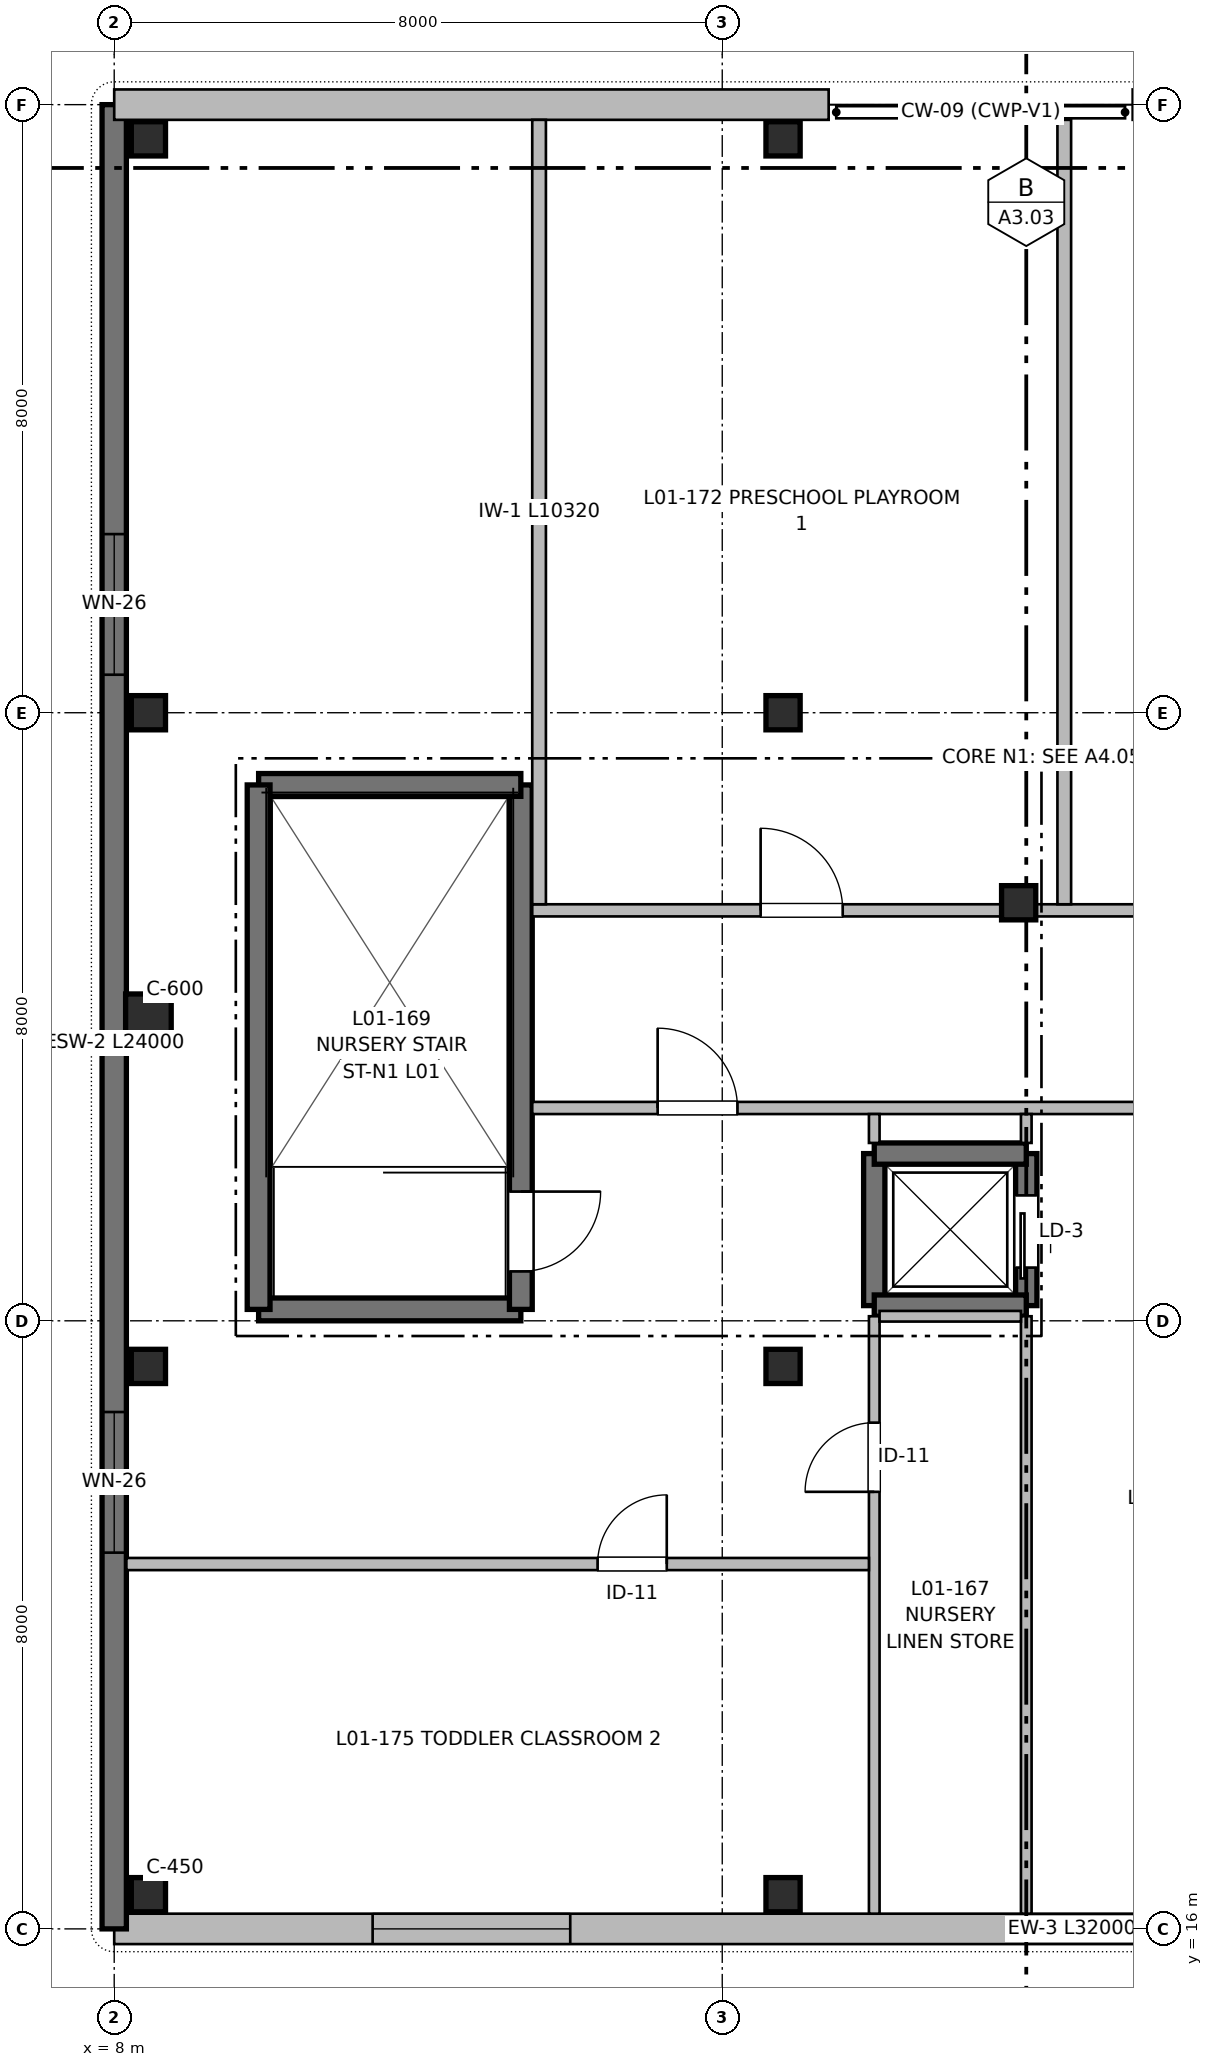
"""IFC4 building model, lengths in metres.
Left out: names, types, materials, properties, quantities, classifications, styles, units other than length and angle.
Written with IfcOpenShell. Run it as: python <this file> out.ifc"""

import sys

from ifc_helpers import new_model, si_unit, direction, frame, frame_2d, origin, origin_2d, place, context, subcontext, project, spatial, rectangle, extrude, element, fill, save


model = new_model("IFC4")
c1 = context("Model", 3, precision=1e-05, world=origin(), true_north=direction((0.0, 1.0)))
c2 = subcontext(c1, "Body", "Model", "MODEL_VIEW")
j1 = project(units=[si_unit("LENGTHUNIT", "METRE"), si_unit("PLANEANGLEUNIT", "RADIAN")], contexts=[c1])
p1 = place(None, origin())
s1 = spatial("IfcSite", under=j1, at=p1, CompositionType="ELEMENT")
p2 = place(p1, origin())
s2 = spatial("IfcBuilding", under=s1, at=p2, CompositionType="ELEMENT")
p3 = place(p2, frame((0.0, 0.0, 4.16)))
s3 = spatial("IfcBuildingStorey", under=s2, at=p3, CompositionType="ELEMENT", Elevation=4.16)
for number, where, z_axis, x_axis in (
    (1, (8.45, 16.45, 0.0), (0.0, 0.0, 1.0), (1.0, 0.0, 0.0)),
    (2, (8.45, 23.4, 0.0), (0.0, 0.0, 1.0), (1.0, 0.0, 0.0)),
):
    element("IfcColumn", number, at=place(p3, frame(where, z_axis=z_axis, x_axis=x_axis)), inside=s3, PredefinedType="COLUMN", context=c2, shape_type="SweptSolid", body=[
        extrude(rectangle(XDim=0.45, YDim=0.45, at=origin_2d()), origin(), (0.0, 0.0, 1.0), 3.2),
    ])
p4 = place(p3, frame((8.45, 28.0, 0.0), z_axis=(0.0, 0.0, 1.0), x_axis=(1.0, 0.0, 0.0)))
e3 = element("IfcColumn", 3, at=p4, inside=s3, PredefinedType="COLUMN", context=c2, shape_type="SweptSolid", body=[
    extrude(rectangle(XDim=0.6, YDim=0.6, at=origin_2d()), origin(), (0.0, 0.0, 1.0), 5.19),
])
for number, where, z_axis, x_axis in (
    (4, (8.45, 32.0, 0.0), (0.0, 0.0, 1.0), (1.0, 0.0, 0.0)),
    (5, (8.45, 39.55, 0.0), (0.0, 0.0, 1.0), (1.0, 0.0, 0.0)),
    (6, (16.8, 16.45, 0.0), (0.0, 0.0, 1.0), (1.0, 0.0, 0.0)),
    (7, (16.8, 23.4, 0.0), (0.0, 0.0, 1.0), (1.0, 0.0, 0.0)),
    (8, (16.8, 32.0, 0.0), (0.0, 0.0, 1.0), (1.0, 0.0, 0.0)),
    (9, (16.8, 39.55, 0.0), (0.0, 0.0, 1.0), (1.0, 0.0, 0.0)),
):
    element("IfcColumn", number, at=place(p3, frame(where, z_axis=z_axis, x_axis=x_axis)), inside=s3, PredefinedType="COLUMN", context=c2, shape_type="SweptSolid", body=[
        extrude(rectangle(XDim=0.45, YDim=0.45, at=origin_2d()), origin(), (0.0, 0.0, 1.0), 3.2),
    ])
p5 = place(p3, frame((19.9, 29.5, 0.0), z_axis=(0.0, 0.0, 1.0), x_axis=(1.0, 0.0, 0.0)))
e10 = element("IfcColumn", 10, at=p5, inside=s3, PredefinedType="COLUMN", context=c2, shape_type="SweptSolid", body=[
    extrude(rectangle(XDim=0.45, YDim=0.45, at=origin_2d()), origin(), (0.0, 0.0, 1.0), 4.89),
])
p6 = place(p3, frame((40.0, 16.0, 0.0), z_axis=(0.0, 0.0, 1.0), x_axis=(-1.0, 0.0, 0.0)))
e11 = element("IfcWall", 11, at=p6, inside=s3, PredefinedType="SOLIDWALL", context=c2, shape_type="SweptSolid", body=[
    extrude(rectangle(XDim=32.0, YDim=0.4, at=frame_2d((16.0, 0.0))), origin(), (0.0, 0.0, 1.0), 3.06),
])
p7 = place(p6, frame((4.0, 0.0, 1.32)))
e12 = element("IfcOpeningElement", 12, at=p7, cuts=e11, PredefinedType="OPENING", context=c2, shape_type="SweptSolid", body=[
    extrude(rectangle(XDim=2.6, YDim=0.9, at=frame_2d((1.3, 0.45))), frame((0.0, 0.21, 0.0), z_axis=(0.0, -1.0, 0.0), x_axis=(1.0, 0.0, 0.0)), (0.0, 0.0, 1.0), 0.42),
])
p8 = place(p6, frame((10.2, 0.0, 1.32)))
e13 = element("IfcOpeningElement", 13, at=p8, cuts=e11, PredefinedType="OPENING", context=c2, shape_type="SweptSolid", body=[
    extrude(rectangle(XDim=2.6, YDim=0.9, at=frame_2d((1.3, 0.45))), frame((0.0, 0.21, 0.0), z_axis=(0.0, -1.0, 0.0), x_axis=(1.0, 0.0, 0.0)), (0.0, 0.0, 1.0), 0.42),
])
p9 = place(p6, frame((26.0, 0.0, 1.32)))
e14 = element("IfcOpeningElement", 14, at=p9, cuts=e11, PredefinedType="OPENING", context=c2, shape_type="SweptSolid", body=[
    extrude(rectangle(XDim=2.6, YDim=0.9, at=frame_2d((1.3, 0.45))), frame((0.0, 0.21, 0.0), z_axis=(0.0, -1.0, 0.0), x_axis=(1.0, 0.0, 0.0)), (0.0, 0.0, 1.0), 0.42),
])
p10 = place(p3, frame((8.0, 16.0, 0.0), z_axis=(0.0, 0.0, 1.0), x_axis=(0.0, 1.0, 0.0)))
e15 = element("IfcWall", 15, at=p10, inside=s3, PredefinedType="SHEAR", context=c2, shape_type="SweptSolid", body=[
    extrude(rectangle(XDim=24.0, YDim=0.32, at=frame_2d((12.0, 0.0))), origin(), (0.0, 0.0, 1.0), 3.06),
])
p11 = place(p10, frame((4.95, 0.0, 0.62)))
e16 = element("IfcOpeningElement", 16, at=p11, cuts=e15, PredefinedType="OPENING", context=c2, shape_type="SweptSolid", body=[
    extrude(rectangle(XDim=1.85, YDim=1.6, at=frame_2d((0.925, 0.8))), frame((0.0, 0.17, 0.0), z_axis=(0.0, -1.0, 0.0), x_axis=(1.0, 0.0, 0.0)), (0.0, 0.0, 1.0), 0.34),
])
p12 = place(p10, frame((16.5, 0.0, 0.62)))
e17 = element("IfcOpeningElement", 17, at=p12, cuts=e15, PredefinedType="OPENING", context=c2, shape_type="SweptSolid", body=[
    extrude(rectangle(XDim=1.85, YDim=1.6, at=frame_2d((0.925, 0.8))), frame((0.0, 0.17, 0.0), z_axis=(0.0, -1.0, 0.0), x_axis=(1.0, 0.0, 0.0)), (0.0, 0.0, 1.0), 0.34),
])
p13 = place(p3, frame((8.0, 40.0, 0.0), z_axis=(0.0, 0.0, 1.0), x_axis=(1.0, 0.0, 0.0)))
e18 = element("IfcWall", 18, at=p13, inside=s3, PredefinedType="SOLIDWALL", context=c2, shape_type="SweptSolid", body=[
    extrude(rectangle(XDim=9.4, YDim=0.4, at=frame_2d((4.7, 0.0))), origin(), (0.0, 0.0, 1.0), 3.06),
])
p14 = place(p3, frame((21.4, 40.0, 0.0), z_axis=(0.0, 0.0, 1.0), x_axis=(1.0, 0.0, 0.0)))
e19 = element("IfcWall", 19, at=p14, inside=s3, PredefinedType="SOLIDWALL", context=c2, shape_type="SweptSolid", body=[
    extrude(rectangle(XDim=4.0, YDim=0.4, at=frame_2d((2.0, 0.0))), origin(), (0.0, 0.0, 1.0), 3.06),
])
p15 = place(p3, frame((9.9, 24.15, 0.0), z_axis=(0.0, 0.0, 1.0), x_axis=(1.0, 0.0, 0.0)))
e20 = element("IfcWall", 20, at=p15, inside=s3, PredefinedType="SHEAR", context=c2, shape_type="SweptSolid", body=[
    extrude(rectangle(XDim=3.45, YDim=0.3, at=frame_2d((1.725, 0.0))), origin(), (0.0, 0.0, 1.0), 3.2),
])
p16 = place(p3, frame((13.35, 31.05, 0.0), z_axis=(0.0, 0.0, 1.0), x_axis=(0.0, -1.0, 0.0)))
e21 = element("IfcWall", 21, at=p16, inside=s3, PredefinedType="SHEAR", context=c2, shape_type="SweptSolid", body=[
    extrude(rectangle(XDim=6.9, YDim=0.3, at=frame_2d((3.45, 0.0))), origin(), (0.0, 0.0, 1.0), 3.2),
])
p17 = place(p16, frame((5.35, 0.0, 0.0)))
e22 = element("IfcOpeningElement", 22, at=p17, cuts=e21, PredefinedType="OPENING", context=c2, shape_type="SweptSolid", body=[
    extrude(rectangle(XDim=1.05, YDim=2.15, at=frame_2d((0.525, 1.075))), frame((0.0, 0.16, 0.0), z_axis=(0.0, -1.0, 0.0), x_axis=(1.0, 0.0, 0.0)), (0.0, 0.0, 1.0), 0.32),
])
p18 = place(p3, frame((9.9, 31.05, 0.0), z_axis=(0.0, 0.0, 1.0), x_axis=(1.0, 0.0, 0.0)))
e23 = element("IfcWall", 23, at=p18, inside=s3, PredefinedType="SHEAR", context=c2, shape_type="SweptSolid", body=[
    extrude(rectangle(XDim=3.45, YDim=0.3, at=frame_2d((1.725, 0.0))), origin(), (0.0, 0.0, 1.0), 3.2),
])
p19 = place(p3, frame((9.9, 24.15, 0.0), z_axis=(0.0, 0.0, 1.0), x_axis=(0.0, 1.0, 0.0)))
e24 = element("IfcWall", 24, at=p19, inside=s3, PredefinedType="SHEAR", context=c2, shape_type="SweptSolid", body=[
    extrude(rectangle(XDim=6.9, YDim=0.3, at=frame_2d((3.45, 0.0))), origin(), (0.0, 0.0, 1.0), 3.2),
])
p20 = place(p3, frame((20.0, 24.2, 0.0), z_axis=(0.0, 0.0, 1.0), x_axis=(0.0, 1.0, 0.0)))
e25 = element("IfcWall", 25, at=p20, inside=s3, PredefinedType="SHEAR", context=c2, shape_type="SweptSolid", body=[
    extrude(rectangle(XDim=2.0, YDim=0.28, at=frame_2d((1.0, 0.0))), origin(), (0.0, 0.0, 1.0), 3.06),
])
p21 = place(p20, frame((0.5, 0.0, 0.0)))
e26 = element("IfcOpeningElement", 26, at=p21, cuts=e25, PredefinedType="OPENING", context=c2, shape_type="SweptSolid", body=[
    extrude(rectangle(XDim=0.95, YDim=2.15, at=frame_2d((0.475, 1.075))), frame((0.0, 0.15, 0.0), z_axis=(0.0, -1.0, 0.0), x_axis=(1.0, 0.0, 0.0)), (0.0, 0.0, 1.0), 0.3),
])
for number, where, z_axis, x_axis in (
    (27, (18.0, 24.2, 0.0), (0.0, 0.0, 1.0), (0.0, 1.0, 0.0)),
    (28, (18.0, 24.2, 0.0), (0.0, 0.0, 1.0), (1.0, 0.0, 0.0)),
    (29, (18.0, 26.2, 0.0), (0.0, 0.0, 1.0), (1.0, 0.0, 0.0)),
):
    element("IfcWall", number, at=place(p3, frame(where, z_axis=z_axis, x_axis=x_axis)), inside=s3, PredefinedType="SHEAR", context=c2, shape_type="SweptSolid", body=[
        extrude(rectangle(XDim=2.0, YDim=0.28, at=frame_2d((1.0, 0.0))), origin(), (0.0, 0.0, 1.0), 3.06),
    ])
p22 = place(p3, frame((13.5, 26.8, 0.0), z_axis=(0.0, 0.0, 1.0), x_axis=(1.0, 0.0, 0.0)))
e30 = element("IfcWall", 30, at=p22, inside=s3, PredefinedType="PARTITIONING", context=c2, shape_type="SweptSolid", body=[
    extrude(rectangle(XDim=20.45, YDim=0.16, at=frame_2d((10.225, 0.0))), origin(), (0.0, 0.0, 1.0), 2.94),
])
p23 = place(p22, frame((1.65, 0.0, 0.0)))
e31 = element("IfcOpeningElement", 31, at=p23, cuts=e30, PredefinedType="OPENING", context=c2, shape_type="SweptSolid", body=[
    extrude(rectangle(XDim=1.05, YDim=2.15, at=frame_2d((0.525, 1.075))), frame((0.0, 0.09, 0.0), z_axis=(0.0, -1.0, 0.0), x_axis=(1.0, 0.0, 0.0)), (0.0, 0.0, 1.0), 0.18),
])
p24 = place(p22, frame((18.45, 0.0, 0.0)))
e32 = element("IfcOpeningElement", 32, at=p24, cuts=e30, PredefinedType="OPENING", context=c2, shape_type="SweptSolid", body=[
    extrude(rectangle(XDim=1.05, YDim=2.15, at=frame_2d((0.525, 1.075))), frame((0.0, 0.09, 0.0), z_axis=(0.0, -1.0, 0.0), x_axis=(1.0, 0.0, 0.0)), (0.0, 0.0, 1.0), 0.18),
])
p25 = place(p22, frame((9.37, 0.0, 0.0)))
e33 = element("IfcOpeningElement", 33, at=p25, cuts=e30, PredefinedType="OPENING", context=c2, shape_type="SweptSolid", body=[
    extrude(rectangle(XDim=1.08, YDim=2.15, at=frame_2d((0.54, 1.075))), frame((0.0, 0.09, 0.0), z_axis=(0.0, -1.0, 0.0), x_axis=(1.0, 0.0, 0.0)), (0.0, 0.0, 1.0), 0.18),
])
p26 = place(p22, frame((14.92, 0.0, 0.0)))
e34 = element("IfcOpeningElement", 34, at=p26, cuts=e30, PredefinedType="OPENING", context=c2, shape_type="SweptSolid", body=[
    extrude(rectangle(XDim=0.87, YDim=2.05, at=frame_2d((0.435, 1.025))), frame((0.0, 0.09, 0.0), z_axis=(0.0, -1.0, 0.0), x_axis=(1.0, 0.0, 0.0)), (0.0, 0.0, 1.0), 0.18),
])
p27 = place(p3, frame((13.5, 29.4, 0.0), z_axis=(0.0, 0.0, 1.0), x_axis=(1.0, 0.0, 0.0)))
e35 = element("IfcWall", 35, at=p27, inside=s3, PredefinedType="PARTITIONING", context=c2, shape_type="SweptSolid", body=[
    extrude(rectangle(XDim=20.45, YDim=0.16, at=frame_2d((10.225, 0.0))), origin(), (0.0, 0.0, 1.0), 2.94),
])
p28 = place(p27, frame((3.005, 0.0, 0.0)))
e36 = element("IfcOpeningElement", 36, at=p28, cuts=e35, PredefinedType="OPENING", context=c2, shape_type="SweptSolid", body=[
    extrude(rectangle(XDim=1.08, YDim=2.15, at=frame_2d((0.54, 1.075))), frame((0.0, 0.09, 0.0), z_axis=(0.0, -1.0, 0.0), x_axis=(1.0, 0.0, 0.0)), (0.0, 0.0, 1.0), 0.18),
])
p29 = place(p27, frame((9.86, 0.0, 0.0)))
e37 = element("IfcOpeningElement", 37, at=p29, cuts=e35, PredefinedType="OPENING", context=c2, shape_type="SweptSolid", body=[
    extrude(rectangle(XDim=1.08, YDim=2.15, at=frame_2d((0.54, 1.075))), frame((0.0, 0.09, 0.0), z_axis=(0.0, -1.0, 0.0), x_axis=(1.0, 0.0, 0.0)), (0.0, 0.0, 1.0), 0.18),
])
p30 = place(p27, frame((16.54, 0.0, 0.0)))
e38 = element("IfcOpeningElement", 38, at=p30, cuts=e35, PredefinedType="OPENING", context=c2, shape_type="SweptSolid", body=[
    extrude(rectangle(XDim=1.08, YDim=2.15, at=frame_2d((0.54, 1.075))), frame((0.0, 0.09, 0.0), z_axis=(0.0, -1.0, 0.0), x_axis=(1.0, 0.0, 0.0)), (0.0, 0.0, 1.0), 0.18),
])
p31 = place(p3, frame((18.0, 16.2, 0.0), z_axis=(0.0, 0.0, 1.0), x_axis=(0.0, 1.0, 0.0)))
e39 = element("IfcWall", 39, at=p31, inside=s3, PredefinedType="PARTITIONING", context=c2, shape_type="SweptSolid", body=[
    extrude(rectangle(XDim=7.86, YDim=0.14, at=frame_2d((3.93, 0.0))), origin(), (0.0, 0.0, 1.0), 2.94),
])
p32 = place(p31, frame((5.55, 0.0, 0.0)))
e40 = element("IfcOpeningElement", 40, at=p32, cuts=e39, PredefinedType="OPENING", context=c2, shape_type="SweptSolid", body=[
    extrude(rectangle(XDim=0.91, YDim=2.1, at=frame_2d((0.455, 1.05))), frame((0.0, 0.08, 0.0), z_axis=(0.0, -1.0, 0.0), x_axis=(1.0, 0.0, 0.0)), (0.0, 0.0, 1.0), 0.16),
])
p33 = place(p3, frame((18.0, 26.34, 0.0), z_axis=(0.0, 0.0, 1.0), x_axis=(0.0, 1.0, 0.0)))
e41 = element("IfcWall", 41, at=p33, inside=s3, PredefinedType="PARTITIONING", context=c2, shape_type="SweptSolid", body=[
    extrude(rectangle(XDim=0.38, YDim=0.14, at=frame_2d((0.19, 0.0))), origin(), (0.0, 0.0, 1.0), 2.94),
])
p34 = place(p3, frame((20.0, 16.2, 0.0), z_axis=(0.0, 0.0, 1.0), x_axis=(0.0, 1.0, 0.0)))
e42 = element("IfcWall", 42, at=p34, inside=s3, PredefinedType="PARTITIONING", context=c2, shape_type="SweptSolid", body=[
    extrude(rectangle(XDim=7.86, YDim=0.14, at=frame_2d((3.93, 0.0))), origin(), (0.0, 0.0, 1.0), 2.94),
])
p35 = place(p3, frame((20.0, 26.34, 0.0), z_axis=(0.0, 0.0, 1.0), x_axis=(0.0, 1.0, 0.0)))
e43 = element("IfcWall", 43, at=p35, inside=s3, PredefinedType="PARTITIONING", context=c2, shape_type="SweptSolid", body=[
    extrude(rectangle(XDim=0.38, YDim=0.14, at=frame_2d((0.19, 0.0))), origin(), (0.0, 0.0, 1.0), 2.94),
])
p36 = place(p3, frame((18.07, 24.06, 0.0), z_axis=(0.0, 0.0, 1.0), x_axis=(1.0, 0.0, 0.0)))
e44 = element("IfcWall", 44, at=p36, inside=s3, PredefinedType="PARTITIONING", context=c2, shape_type="SweptSolid", body=[
    extrude(rectangle(XDim=1.86, YDim=0.14, at=frame_2d((0.93, 0.0))), origin(), (0.0, 0.0, 1.0), 2.94),
])
for number, where, z_axis, x_axis in (
    (45, (13.59, 29.48, 0.0), (0.0, 0.0, 1.0), (0.0, 1.0, 0.0)),
    (46, (20.5, 29.48, 0.0), (0.0, 0.0, 1.0), (0.0, 1.0, 0.0)),
):
    element("IfcWall", number, at=place(p3, frame(where, z_axis=z_axis, x_axis=x_axis)), inside=s3, PredefinedType="PARTITIONING", context=c2, shape_type="SweptSolid", body=[
        extrude(rectangle(XDim=10.32, YDim=0.18, at=frame_2d((5.16, 0.0))), origin(), (0.0, 0.0, 1.0), 2.94),
    ])
p37 = place(p3, frame((8.16, 20.8, 0.0), z_axis=(0.0, 0.0, 1.0), x_axis=(1.0, 0.0, 0.0)))
e47 = element("IfcWall", 47, at=p37, inside=s3, PredefinedType="PARTITIONING", context=c2, shape_type="SweptSolid", body=[
    extrude(rectangle(XDim=9.77, YDim=0.16, at=frame_2d((4.885, 0.0))), origin(), (0.0, 0.0, 1.0), 2.94),
])
p38 = place(p37, frame((6.2, 0.0, 0.0)))
e48 = element("IfcOpeningElement", 48, at=p38, cuts=e47, PredefinedType="OPENING", context=c2, shape_type="SweptSolid", body=[
    extrude(rectangle(XDim=0.91, YDim=2.1, at=frame_2d((0.455, 1.05))), frame((0.0, 0.09, 0.0), z_axis=(0.0, -1.0, 0.0), x_axis=(1.0, 0.0, 0.0)), (0.0, 0.0, 1.0), 0.18),
])
p39 = place(p9, origin())
e49 = element("IfcWindow", 49, at=p39, inside=s3, PartitioningType="SINGLE_PANEL", PredefinedType="WINDOW", context=c2, shape_type="SweptSolid", body=[
    extrude(rectangle(XDim=2.6, YDim=0.9, at=frame_2d((1.3, 0.45))), frame((0.0, 0.03, 0.0), z_axis=(0.0, -1.0, 0.0), x_axis=(1.0, 0.0, 0.0)), (0.0, 0.0, 1.0), 0.06),
])
fill(e14, e49)
p40 = place(p11, origin())
e50 = element("IfcWindow", 50, at=p40, inside=s3, PartitioningType="SINGLE_PANEL", PredefinedType="WINDOW", context=c2, shape_type="SweptSolid", body=[
    extrude(rectangle(XDim=1.85, YDim=1.6, at=frame_2d((0.925, 0.8))), frame((0.0, 0.03, 0.0), z_axis=(0.0, -1.0, 0.0), x_axis=(1.0, 0.0, 0.0)), (0.0, 0.0, 1.0), 0.06),
])
fill(e16, e50)
p41 = place(p12, origin())
e51 = element("IfcWindow", 51, at=p41, inside=s3, PartitioningType="SINGLE_PANEL", PredefinedType="WINDOW", context=c2, shape_type="SweptSolid", body=[
    extrude(rectangle(XDim=1.85, YDim=1.6, at=frame_2d((0.925, 0.8))), frame((0.0, 0.03, 0.0), z_axis=(0.0, -1.0, 0.0), x_axis=(1.0, 0.0, 0.0)), (0.0, 0.0, 1.0), 0.06),
])
fill(e17, e51)
p42 = place(p17, origin())
e52 = element("IfcDoor", 52, at=p42, inside=s3, OperationType="SINGLE_SWING_LEFT", PredefinedType="DOOR", context=c2, shape_type="SweptSolid", body=[
    extrude(rectangle(XDim=1.05, YDim=2.15, at=frame_2d((0.525, 1.075))), frame((0.0, 0.025, 0.0), z_axis=(0.0, -1.0, 0.0), x_axis=(1.0, 0.0, 0.0)), (0.0, 0.0, 1.0), 0.05),
])
fill(e22, e52)
p43 = place(p21, origin())
e53 = element("IfcDoor", 53, at=p43, inside=s3, OperationType="SLIDING_TO_LEFT", PredefinedType="DOOR", context=c2, shape_type="SweptSolid", body=[
    extrude(rectangle(XDim=0.95, YDim=2.15, at=frame_2d((0.475, 1.075))), frame((0.0, 0.025, 0.0), z_axis=(0.0, -1.0, 0.0), x_axis=(1.0, 0.0, 0.0)), (0.0, 0.0, 1.0), 0.05),
])
fill(e26, e53)
p44 = place(p23, origin())
e54 = element("IfcDoor", 54, at=p44, inside=s3, OperationType="SINGLE_SWING_LEFT", PredefinedType="DOOR", context=c2, shape_type="SweptSolid", body=[
    extrude(rectangle(XDim=1.05, YDim=2.15, at=frame_2d((0.525, 1.075))), frame((0.0, 0.025, 0.0), z_axis=(0.0, -1.0, 0.0), x_axis=(1.0, 0.0, 0.0)), (0.0, 0.0, 1.0), 0.05),
])
fill(e31, e54)
p45 = place(p28, origin())
e55 = element("IfcDoor", 55, at=p45, inside=s3, OperationType="SINGLE_SWING_LEFT", PredefinedType="DOOR", context=c2, shape_type="SweptSolid", body=[
    extrude(rectangle(XDim=1.08, YDim=2.15, at=frame_2d((0.54, 1.075))), frame((0.0, 0.025, 0.0), z_axis=(0.0, -1.0, 0.0), x_axis=(1.0, 0.0, 0.0)), (0.0, 0.0, 1.0), 0.05),
])
fill(e36, e55)
p46 = place(p38, origin())
e56 = element("IfcDoor", 56, at=p46, inside=s3, OperationType="SINGLE_SWING_RIGHT", PredefinedType="DOOR", context=c2, shape_type="SweptSolid", body=[
    extrude(rectangle(XDim=0.91, YDim=2.1, at=frame_2d((0.455, 1.05))), frame((0.0, 0.025, 0.0), z_axis=(0.0, -1.0, 0.0), x_axis=(1.0, 0.0, 0.0)), (0.0, 0.0, 1.0), 0.05),
])
fill(e48, e56)
p47 = place(p32, origin())
e57 = element("IfcDoor", 57, at=p47, inside=s3, OperationType="SINGLE_SWING_LEFT", PredefinedType="DOOR", context=c2, shape_type="SweptSolid", body=[
    extrude(rectangle(XDim=0.91, YDim=2.1, at=frame_2d((0.455, 1.05))), frame((0.0, 0.025, 0.0), z_axis=(0.0, -1.0, 0.0), x_axis=(1.0, 0.0, 0.0)), (0.0, 0.0, 1.0), 0.05),
])
fill(e40, e57)
save(model, sys.argv[1])
